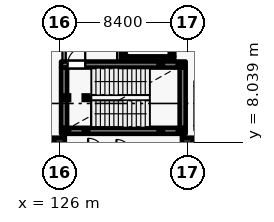
"""IFC4 building model, lengths in metres.
Left out: names, types, materials, properties, quantities, classifications, styles, units other than length and angle.
Written with IfcOpenShell. Run it as: python <this file> out.ifc"""

import sys

from ifc_helpers import new_model, si_unit, direction, frame, frame_2d, origin, origin_2d, place, context, subcontext, project, spatial, rectangle, hollow_rectangle, extrude, element, fill, save


model = new_model("IFC4")
c1 = context("Model", 3, precision=1e-05, world=origin(), true_north=direction((0.0, 1.0)))
c2 = subcontext(c1, "Body", "Model", "MODEL_VIEW")
j1 = project(units=[si_unit("LENGTHUNIT", "METRE"), si_unit("PLANEANGLEUNIT", "RADIAN")], contexts=[c1])
p1 = place(None, origin())
s1 = spatial("IfcSite", under=j1, at=p1, CompositionType="ELEMENT")
p2 = place(p1, origin())
s2 = spatial("IfcBuilding", under=s1, at=p2, CompositionType="ELEMENT")
p3 = place(p2, frame((0.0, 0.0, 11.4)))
s3 = spatial("IfcBuildingStorey", under=s2, at=p3, CompositionType="ELEMENT", Elevation=11.4)
for number, where, z_axis, x_axis in (
    (1, (126.0, 8.0, 0.0), (0.0, 0.0, 1.0), (1.0, 0.0, 0.0)),
    (2, (134.4, 8.0, 0.0), (0.0, 0.0, 1.0), (1.0, 0.0, 0.0)),
):
    element("IfcColumn", number, at=place(p3, frame(where, z_axis=z_axis, x_axis=x_axis)), inside=s3, PredefinedType="COLUMN", context=c2, shape_type="SweptSolid", body=[
        extrude(rectangle(XDim=0.7, YDim=0.7, at=origin_2d()), origin(), (0.0, 0.0, 1.0), 4.8),
    ])
p4 = place(p3, frame((130.05, 13.55, 0.0), z_axis=(0.0, 0.0, 1.0), x_axis=(1.0, 0.0, 0.0)))
e3 = element("IfcWall", 3, at=p4, inside=s3, PredefinedType="SHEAR", context=c2, shape_type="SweptSolid", body=[
    extrude(rectangle(XDim=3.5, YDim=0.3, at=frame_2d((1.75, 0.0))), origin(), (0.0, 0.0, 1.0), 4.535),
])
for number, where, z_axis, x_axis in (
    (4, (133.4, 13.705, 0.0), (0.0, 0.0, 1.0), (0.0, 1.0, 0.0)),
    (5, (130.2, 16.295, 0.0), (0.0, 0.0, 1.0), (0.0, -1.0, 0.0)),
):
    element("IfcWall", number, at=place(p3, frame(where, z_axis=z_axis, x_axis=x_axis)), inside=s3, PredefinedType="SHEAR", context=c2, shape_type="SweptSolid", body=[
        extrude(rectangle(XDim=2.59, YDim=0.3, at=frame_2d((1.295, 0.0))), origin(), (0.0, 0.0, 1.0), 4.535),
    ])
p5 = place(p3, frame((126.1, 8.8, 0.0), z_axis=(0.0, 0.0, 1.0), x_axis=(1.0, 0.0, 0.0)))
e6 = element("IfcWall", 6, at=p5, inside=s3, PredefinedType="SHEAR", context=c2, shape_type="SweptSolid", body=[
    extrude(rectangle(XDim=8.2, YDim=0.4, at=frame_2d((4.1, 0.0))), origin(), (0.0, 0.0, 1.0), 4.535),
])
p6 = place(p3, frame((134.1, 9.005, 0.0), z_axis=(0.0, 0.0, 1.0), x_axis=(0.0, 1.0, 0.0)))
e7 = element("IfcWall", 7, at=p6, inside=s3, PredefinedType="SHEAR", context=c2, shape_type="SweptSolid", body=[
    extrude(rectangle(XDim=3.95, YDim=0.4, at=frame_2d((1.975, 0.0))), origin(), (0.0, 0.0, 1.0), 4.535),
])
p7 = place(p3, frame((126.1, 13.16, 0.0), z_axis=(0.0, 0.0, 1.0), x_axis=(1.0, 0.0, 0.0)))
e8 = element("IfcWall", 8, at=p7, inside=s3, PredefinedType="SHEAR", context=c2, shape_type="SweptSolid", body=[
    extrude(rectangle(XDim=8.2, YDim=0.4, at=frame_2d((4.1, 0.0))), origin(), (0.0, 0.0, 1.0), 4.535),
])
p8 = place(p7, frame((0.43, 0.0, 0.0)))
e9 = element("IfcOpeningElement", 9, at=p8, cuts=e8, PredefinedType="OPENING", context=c2, shape_type="SweptSolid", body=[
    extrude(rectangle(XDim=1.16, YDim=2.2, at=frame_2d((0.58, 1.1))), frame((0.0, 0.21, 0.0), z_axis=(0.0, -1.0, 0.0), x_axis=(1.0, 0.0, 0.0)), (0.0, 0.0, 1.0), 0.42),
])
p9 = place(p3, frame((126.3, 9.005, 0.0), z_axis=(0.0, 0.0, 1.0), x_axis=(0.0, 1.0, 0.0)))
e10 = element("IfcWall", 10, at=p9, inside=s3, PredefinedType="SHEAR", context=c2, shape_type="SweptSolid", body=[
    extrude(rectangle(XDim=3.95, YDim=0.4, at=frame_2d((1.975, 0.0))), origin(), (0.0, 0.0, 1.0), 4.535),
])
p10 = place(p3, frame((126.3, 13.365, 0.0), z_axis=(0.0, 0.0, 1.0), x_axis=(0.0, 1.0, 0.0)))
e11 = element("IfcWall", 11, at=p10, inside=s3, PredefinedType="PARTITIONING", context=c2, shape_type="SweptSolid", body=[
    extrude(rectangle(XDim=5.82, YDim=0.22, at=frame_2d((2.91, 0.0))), origin(), (0.0, 0.0, 1.0), 4.535),
])
p11 = place(p3, frame((129.9, 13.365, 0.0), z_axis=(0.0, 0.0, 1.0), x_axis=(0.0, 1.0, 0.0)))
e12 = element("IfcWall", 12, at=p11, inside=s3, PredefinedType="PARTITIONING", context=c2, shape_type="SweptSolid", body=[
    extrude(rectangle(XDim=5.82, YDim=0.22, at=frame_2d((2.91, 0.0))), origin(), (0.0, 0.0, 1.0), 4.535),
])
p12 = place(p11, frame((3.335, 0.0, 0.0)))
e13 = element("IfcOpeningElement", 13, at=p12, cuts=e12, PredefinedType="OPENING", context=c2, shape_type="SweptSolid", body=[
    extrude(rectangle(XDim=1.24, YDim=2.2, at=frame_2d((0.62, 1.1))), frame((0.0, 0.12, 0.0), z_axis=(0.0, -1.0, 0.0), x_axis=(1.0, 0.0, 0.0)), (0.0, 0.0, 1.0), 0.24),
])
for number, where, z_axis, x_axis in (
    (14, (126.48, 8.8, 0.0), (0.0, 0.0, 1.0), (1.0, 0.0, 0.0)),
    (15, (126.48, 10.98, 0.0), (0.0, 0.0, 1.0), (1.0, 0.0, 0.0)),
    (16, (127.74, 8.8, 0.0), (0.0, 0.0, 1.0), (1.0, 0.0, 0.0)),
    (17, (127.74, 10.98, 0.0), (0.0, 0.0, 1.0), (1.0, 0.0, 0.0)),
):
    element("IfcColumn", number, at=place(p3, frame(where, z_axis=z_axis, x_axis=x_axis)), inside=s3, PredefinedType="COLUMN", context=c2, shape_type="SweptSolid", body=[
        extrude(hollow_rectangle(XDim=0.3, YDim=0.3, WallThickness=0.012, at=origin_2d()), origin(), (0.0, 0.0, 1.0), 4.62),
    ])
for number, where, z_axis, x_axis in (
    (18, (132.66, 8.8, -2.7), (0.0, 0.0, 1.0), (1.0, 0.0, 0.0)),
    (19, (132.66, 13.16, -2.7), (0.0, 0.0, 1.0), (1.0, 0.0, 0.0)),
    (20, (133.92, 8.8, -2.7), (0.0, 0.0, 1.0), (1.0, 0.0, 0.0)),
    (21, (133.92, 13.16, -2.7), (0.0, 0.0, 1.0), (1.0, 0.0, 0.0)),
):
    element("IfcColumn", number, at=place(p3, frame(where, z_axis=z_axis, x_axis=x_axis)), inside=s3, PredefinedType="COLUMN", context=c2, shape_type="SweptSolid", body=[
        extrude(hollow_rectangle(XDim=0.3, YDim=0.3, WallThickness=0.012, at=origin_2d()), origin(), (0.0, 0.0, 1.0), 4.92),
    ])
p13 = place(p8, origin())
e22 = element("IfcDoor", 22, at=p13, inside=s3, OperationType="SINGLE_SWING_RIGHT", PredefinedType="DOOR", context=c2, shape_type="SweptSolid", body=[
    extrude(rectangle(XDim=1.16, YDim=2.2, at=frame_2d((0.58, 1.1))), frame((0.0, 0.025, 0.0), z_axis=(0.0, -1.0, 0.0), x_axis=(1.0, 0.0, 0.0)), (0.0, 0.0, 1.0), 0.05),
])
fill(e9, e22)
save(model, sys.argv[1])
